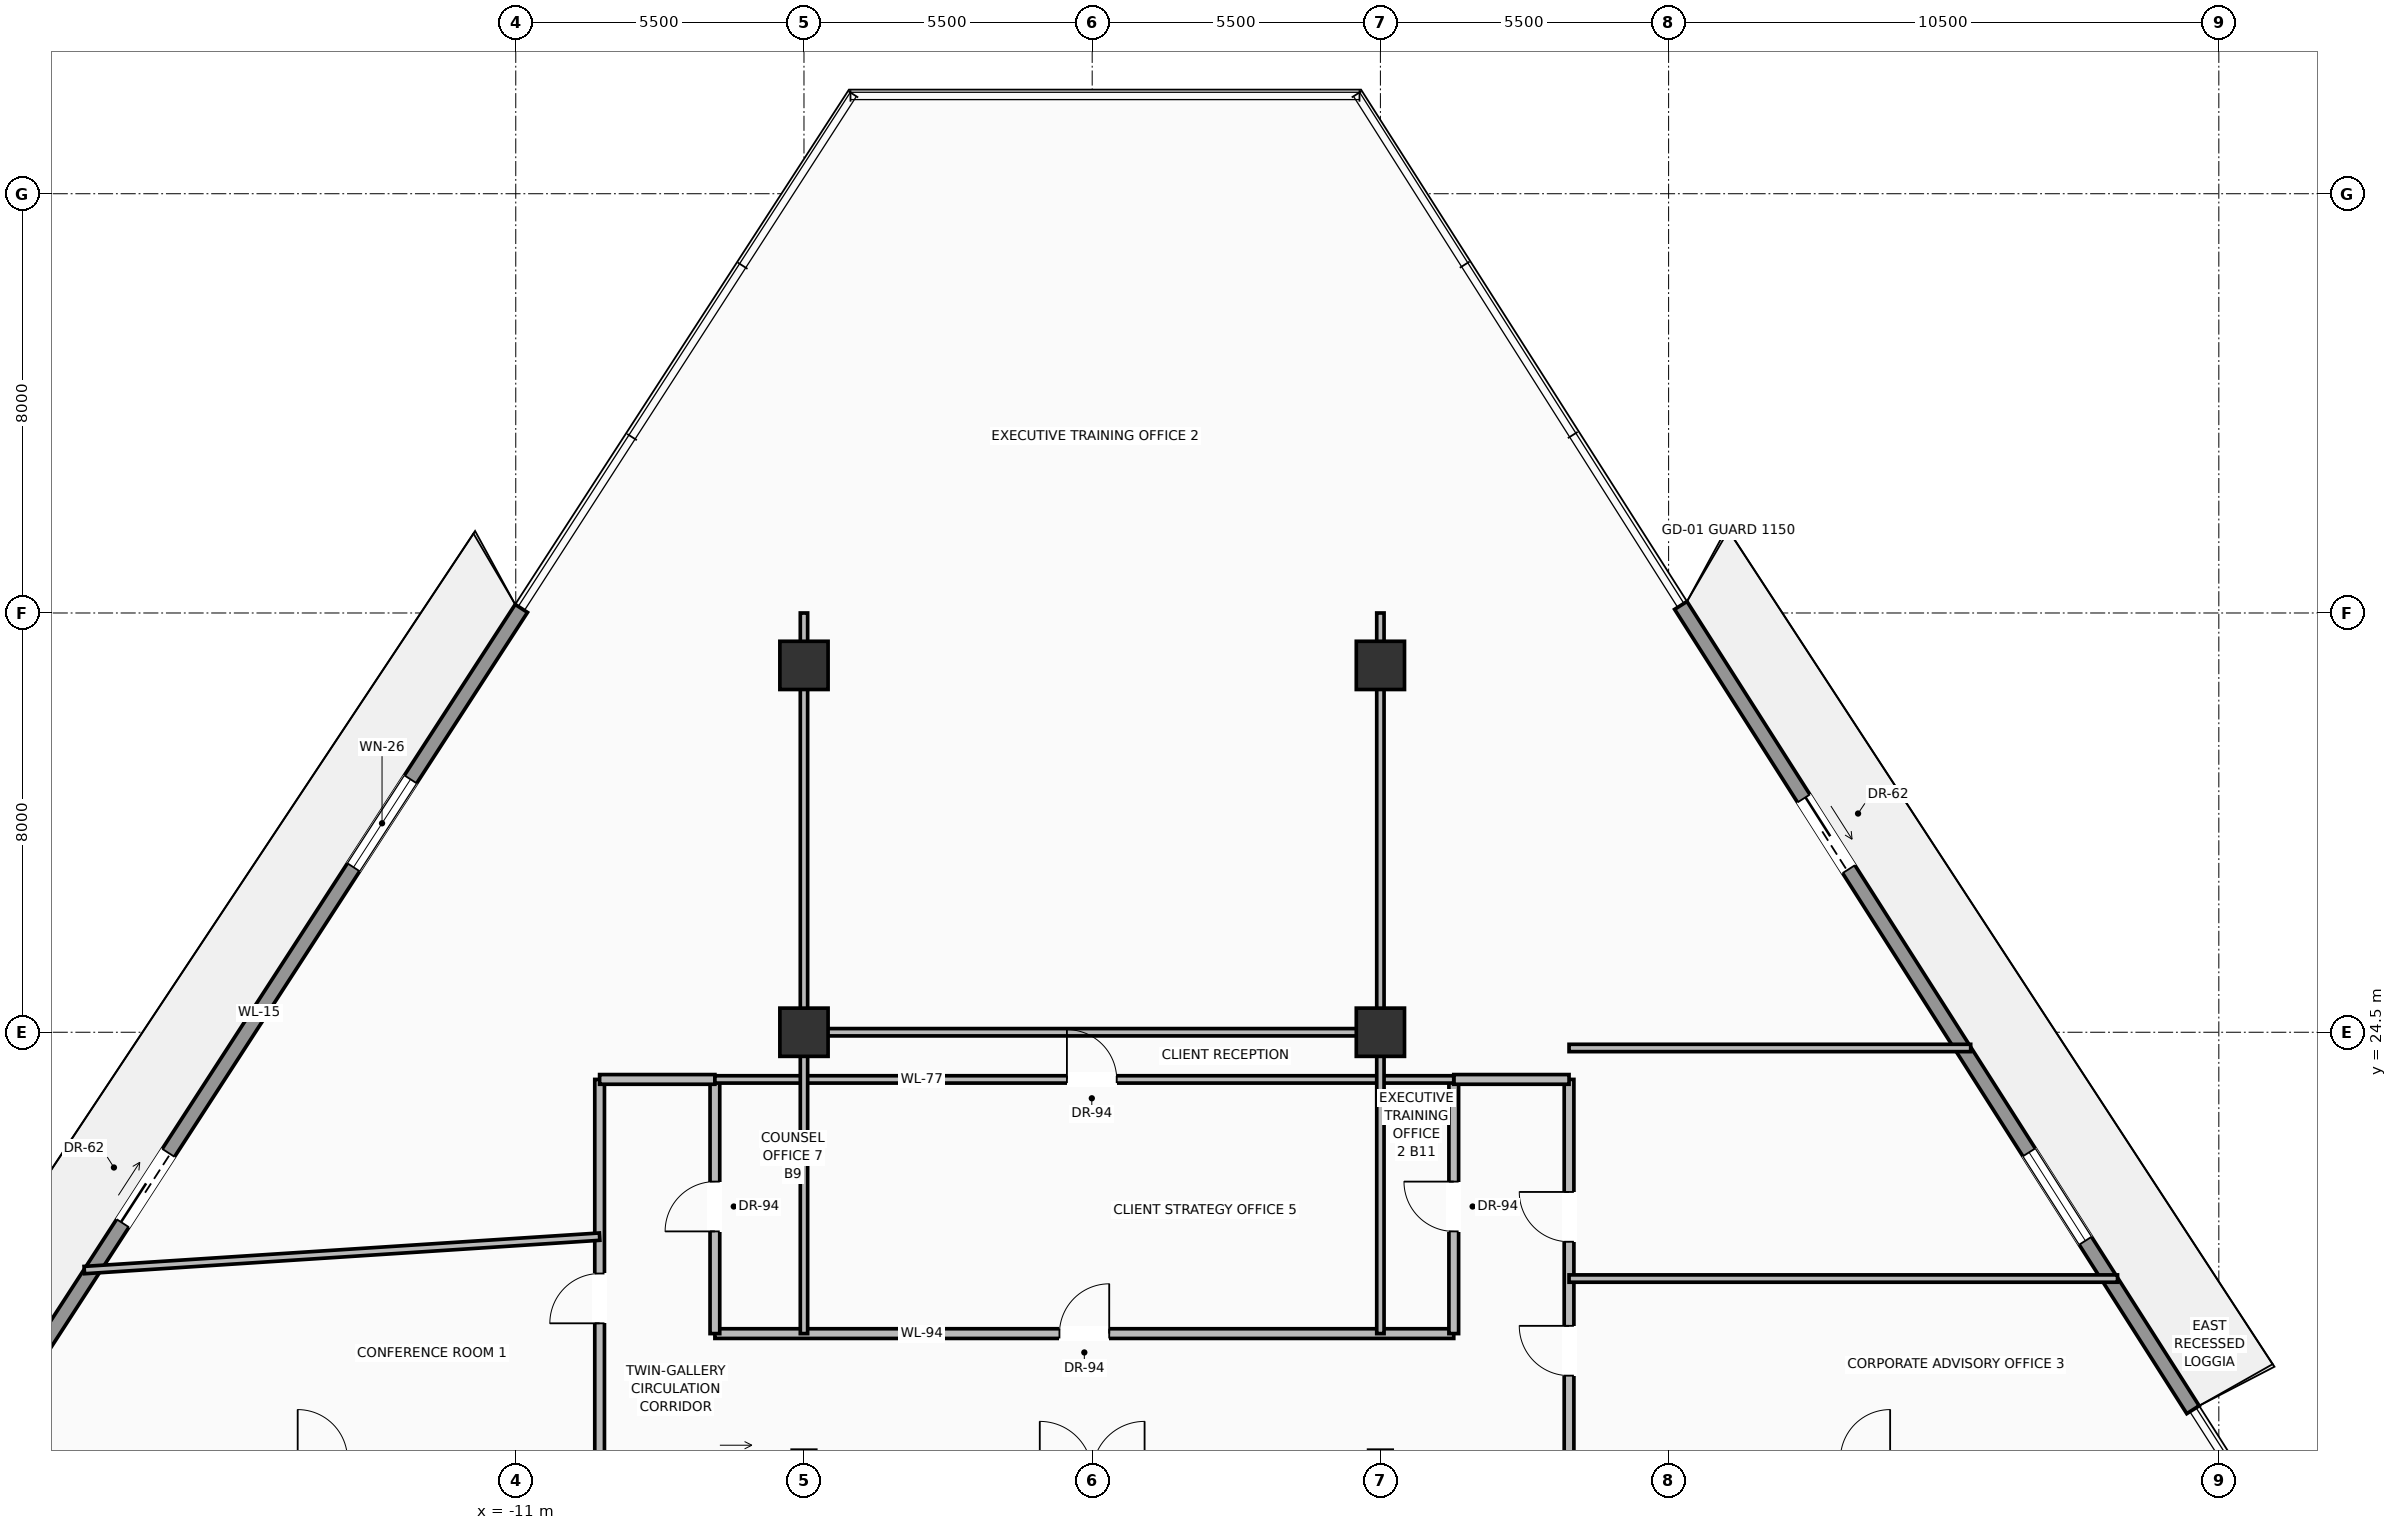
"""IFC4 building model, lengths in metres.
Left out: names, types, materials, properties, quantities, classifications, styles, units other than length and angle.
Written with IfcOpenShell. Run it as: python <this file> out.ifc"""

import sys

from ifc_helpers import new_model, si_unit, direction, frame, frame_2d, origin, origin_2d, place, context, subcontext, project, spatial, rectangle, extrude, source, transform, mapped, element, fill, save


model = new_model("IFC4")
c1 = context("Model", 3, precision=1e-05, world=origin(), true_north=direction((0.0, 1.0)))
c2 = subcontext(c1, "Body", "Model", "MODEL_VIEW")
j1 = project(units=[si_unit("LENGTHUNIT", "METRE"), si_unit("PLANEANGLEUNIT", "RADIAN")], contexts=[c1])
p1 = place(None, origin())
s1 = spatial("IfcSite", under=j1, at=p1, CompositionType="ELEMENT")
p2 = place(p1, origin())
s2 = spatial("IfcBuilding", under=s1, at=p2, CompositionType="ELEMENT")
p3 = place(p2, frame((0.0, 0.0, 144.1)))
s3 = spatial("IfcBuildingStorey", under=s2, at=p3, CompositionType="ELEMENT", Elevation=144.1)
m1 = source(origin(), c2, "Body", "SweptSolid", [
    extrude(rectangle(XDim=0.92, YDim=0.92, at=origin_2d()), origin(), (0.0, 0.0, 1.0), 3.7),
])
for number, where, z_axis, x_axis in (
    (1, (-5.5, 24.5, 0.0), (0.0, 0.0, 1.0), (1.0, 0.0, 0.0)),
    (2, (5.5, 24.5, 0.0), (0.0, 0.0, 1.0), (1.0, 0.0, 0.0)),
    (3, (-5.5, 31.5, 0.0), (0.0, 0.0, 1.0), (1.0, 0.0, 0.0)),
    (4, (5.5, 31.5, 0.0), (0.0, 0.0, 1.0), (1.0, 0.0, 0.0)),
):
    element("IfcColumn", number, at=place(p3, frame(where, z_axis=z_axis, x_axis=x_axis)), inside=s3, PredefinedType="COLUMN", context=c2, shape_type="MappedRepresentation", body=[
        mapped(m1, transform((0.0, 0.0, 0.0), scale=1.0)),
    ])
p4 = place(p3, frame((-20.901, 17.152, 0.0), z_axis=(0.0, 0.0, 1.0), x_axis=(0.544015380352, 0.839075244505, 0.0)))
e5 = element("IfcWall", 5, at=p4, inside=s3, PredefinedType="SOLIDWALL", context=c2, shape_type="SweptSolid", body=[
    extrude(rectangle(XDim=18.396, YDim=0.28, at=frame_2d((9.198, 0.0))), origin(), (0.0, 0.0, 1.0), 3.05),
])
p5 = place(p4, frame((4.415, 0.0, 0.0)))
e6 = element("IfcOpeningElement", 6, at=p5, cuts=e5, PredefinedType="OPENING", context=c2, shape_type="SweptSolid", body=[
    extrude(rectangle(XDim=1.6, YDim=2.35, at=frame_2d((0.8, 1.175))), frame((0.0, 0.15, 0.0), z_axis=(0.0, -1.0, 0.0), x_axis=(1.0, 0.0, 0.0)), (0.0, 0.0, 1.0), 0.3),
])
p6 = place(p4, frame((12.509, 0.0, 0.9)))
e7 = element("IfcOpeningElement", 7, at=p6, cuts=e5, PredefinedType="OPENING", context=c2, shape_type="SweptSolid", body=[
    extrude(rectangle(XDim=2.0, YDim=1.85, at=frame_2d((1.0, 0.925))), frame((0.0, 0.15, 0.0), z_axis=(0.0, -1.0, 0.0), x_axis=(1.0, 0.0, 0.0)), (0.0, 0.0, 1.0), 0.3),
])
p7 = place(p3, frame((11.233, 32.645, 0.0), z_axis=(0.0, 0.0, 1.0), x_axis=(0.537170652274, -0.843473586033, 0.0)))
e8 = element("IfcWall", 8, at=p7, inside=s3, PredefinedType="SOLIDWALL", context=c2, shape_type="SweptSolid", body=[
    extrude(rectangle(XDim=18.195, YDim=0.28, at=frame_2d((9.098, 0.0))), origin(), (0.0, 0.0, 1.0), 3.05),
])
p8 = place(p7, frame((4.367, 0.0, 0.0)))
e9 = element("IfcOpeningElement", 9, at=p8, cuts=e8, PredefinedType="OPENING", context=c2, shape_type="SweptSolid", body=[
    extrude(rectangle(XDim=1.6, YDim=2.35, at=frame_2d((0.8, 1.175))), frame((0.0, 0.15, 0.0), z_axis=(0.0, -1.0, 0.0), x_axis=(1.0, 0.0, 0.0)), (0.0, 0.0, 1.0), 0.3),
])
p9 = place(p7, frame((12.373, 0.0, 0.9)))
e10 = element("IfcOpeningElement", 10, at=p9, cuts=e8, PredefinedType="OPENING", context=c2, shape_type="SweptSolid", body=[
    extrude(rectangle(XDim=2.0, YDim=1.85, at=frame_2d((1.0, 0.925))), frame((0.0, 0.15, 0.0), z_axis=(0.0, -1.0, 0.0), x_axis=(1.0, 0.0, 0.0)), (0.0, 0.0, 1.0), 0.3),
])
p10 = place(p3, frame((-7.2, 18.75, 0.0), z_axis=(0.0, 0.0, 1.0), x_axis=(1.0, 0.0, 0.0)))
e11 = element("IfcWall", 11, at=p10, inside=s3, PredefinedType="PARTITIONING", context=c2, shape_type="SweptSolid", body=[
    extrude(rectangle(XDim=14.1, YDim=0.185, at=frame_2d((7.05, 0.0))), origin(), (0.0, 0.0, 1.0), 2.846),
])
p11 = place(p10, frame((6.575, 0.0, 0.0)))
e12 = element("IfcOpeningElement", 12, at=p11, cuts=e11, PredefinedType="OPENING", context=c2, shape_type="SweptSolid", body=[
    extrude(rectangle(XDim=0.95, YDim=2.2, at=frame_2d((0.475, 1.1))), frame((0.0, 0.103, 0.0), z_axis=(0.0, -1.0, 0.0), x_axis=(1.0, 0.0, 0.0)), (0.0, 0.0, 1.0), 0.205),
])
p12 = place(p3, frame((-7.2, 18.75, 0.0), z_axis=(0.0, 0.0, 1.0), x_axis=(0.0, 1.0, 0.0)))
e13 = element("IfcWall", 13, at=p12, inside=s3, PredefinedType="PARTITIONING", context=c2, shape_type="SweptSolid", body=[
    extrude(rectangle(XDim=4.85, YDim=0.185, at=frame_2d((2.425, 0.0))), origin(), (0.0, 0.0, 1.0), 3.462),
])
p13 = place(p12, frame((1.95, 0.0, 0.0)))
e14 = element("IfcOpeningElement", 14, at=p13, cuts=e13, PredefinedType="OPENING", context=c2, shape_type="SweptSolid", body=[
    extrude(rectangle(XDim=0.95, YDim=2.2, at=frame_2d((0.475, 1.1))), frame((0.0, 0.103, 0.0), z_axis=(0.0, -1.0, 0.0), x_axis=(1.0, 0.0, 0.0)), (0.0, 0.0, 1.0), 0.205),
])
p14 = place(p3, frame((6.9, 18.75, 0.0), z_axis=(0.0, 0.0, 1.0), x_axis=(0.0, 1.0, 0.0)))
e15 = element("IfcWall", 15, at=p14, inside=s3, PredefinedType="PARTITIONING", context=c2, shape_type="SweptSolid", body=[
    extrude(rectangle(XDim=4.85, YDim=0.185, at=frame_2d((2.425, 0.0))), origin(), (0.0, 0.0, 1.0), 3.462),
])
p15 = place(p14, frame((1.95, 0.0, 0.0)))
e16 = element("IfcOpeningElement", 16, at=p15, cuts=e15, PredefinedType="OPENING", context=c2, shape_type="SweptSolid", body=[
    extrude(rectangle(XDim=0.95, YDim=2.2, at=frame_2d((0.475, 1.1))), frame((0.0, 0.103, 0.0), z_axis=(0.0, -1.0, 0.0), x_axis=(1.0, 0.0, 0.0)), (0.0, 0.0, 1.0), 0.205),
])
p16 = place(p3, frame((-9.4, 16.4, 0.0), z_axis=(0.0, 0.0, 1.0), x_axis=(0.0, 1.0, 0.0)))
e17 = element("IfcWall", 17, at=p16, inside=s3, PredefinedType="PARTITIONING", context=c2, shape_type="SweptSolid", body=[
    extrude(rectangle(XDim=7.2, YDim=0.185, at=frame_2d((3.6, 0.0))), origin(), (0.0, 0.0, 1.0), 3.462),
])
p17 = place(p16, frame((2.546, 0.0, 0.0)))
e18 = element("IfcOpeningElement", 18, at=p17, cuts=e17, PredefinedType="OPENING", context=c2, shape_type="SweptSolid", body=[
    extrude(rectangle(XDim=0.95, YDim=2.2, at=frame_2d((0.475, 1.1))), frame((0.0, 0.103, 0.0), z_axis=(0.0, -1.0, 0.0), x_axis=(1.0, 0.0, 0.0)), (0.0, 0.0, 1.0), 0.205),
])
p18 = place(p3, frame((9.1, 16.4, 0.0), z_axis=(0.0, 0.0, 1.0), x_axis=(0.0, 1.0, 0.0)))
e19 = element("IfcWall", 19, at=p18, inside=s3, PredefinedType="PARTITIONING", context=c2, shape_type="SweptSolid", body=[
    extrude(rectangle(XDim=7.2, YDim=0.185, at=frame_2d((3.6, 0.0))), origin(), (0.0, 0.0, 1.0), 3.462),
])
p19 = place(p18, frame((4.103, 0.0, 0.0)))
e20 = element("IfcOpeningElement", 20, at=p19, cuts=e19, PredefinedType="OPENING", context=c2, shape_type="SweptSolid", body=[
    extrude(rectangle(XDim=0.95, YDim=2.2, at=frame_2d((0.475, 1.1))), frame((0.0, 0.103, 0.0), z_axis=(0.0, -1.0, 0.0), x_axis=(1.0, 0.0, 0.0)), (0.0, 0.0, 1.0), 0.205),
])
p20 = place(p18, frame((1.548, 0.0, 0.0)))
e21 = element("IfcOpeningElement", 21, at=p20, cuts=e19, PredefinedType="OPENING", context=c2, shape_type="SweptSolid", body=[
    extrude(rectangle(XDim=0.95, YDim=2.2, at=frame_2d((0.475, 1.1))), frame((0.0, 0.103, 0.0), z_axis=(0.0, -1.0, 0.0), x_axis=(1.0, 0.0, 0.0)), (0.0, 0.0, 1.0), 0.205),
])
p21 = place(p3, frame((-9.4, 23.6, 0.0), z_axis=(0.0, 0.0, 1.0), x_axis=(1.0, 0.0, 0.0)))
e22 = element("IfcWall", 22, at=p21, inside=s3, PredefinedType="PARTITIONING", context=c2, shape_type="SweptSolid", body=[
    extrude(rectangle(XDim=2.2, YDim=0.185, at=frame_2d((1.1, 0.0))), origin(), (0.0, 0.0, 1.0), 3.462),
])
p22 = place(p3, frame((6.9, 23.6, 0.0), z_axis=(0.0, 0.0, 1.0), x_axis=(1.0, 0.0, 0.0)))
e23 = element("IfcWall", 23, at=p22, inside=s3, PredefinedType="PARTITIONING", context=c2, shape_type="SweptSolid", body=[
    extrude(rectangle(XDim=2.2, YDim=0.185, at=frame_2d((1.1, 0.0))), origin(), (0.0, 0.0, 1.0), 3.462),
])
p23 = place(p3, frame((-7.2, 23.6, 0.0), z_axis=(0.0, 0.0, 1.0), x_axis=(1.0, 0.0, 0.0)))
e24 = element("IfcWall", 24, at=p23, inside=s3, PredefinedType="PARTITIONING", context=c2, shape_type="SweptSolid", body=[
    extrude(rectangle(XDim=14.1, YDim=0.14, at=frame_2d((7.05, 0.0))), origin(), (0.0, 0.0, 1.0), 3.462),
])
p24 = place(p23, frame((6.718, 0.0, 0.0)))
e25 = element("IfcOpeningElement", 25, at=p24, cuts=e24, PredefinedType="OPENING", context=c2, shape_type="SweptSolid", body=[
    extrude(rectangle(XDim=0.95, YDim=2.2, at=frame_2d((0.475, 1.1))), frame((0.0, 0.08, 0.0), z_axis=(0.0, -1.0, 0.0), x_axis=(1.0, 0.0, 0.0)), (0.0, 0.0, 1.0), 0.16),
])
for number, where, z_axis, x_axis in (
    (26, (-5.5, 18.75, 0.0), (0.0, 0.0, 1.0), (0.0, 1.0, 0.0)),
    (27, (5.5, 18.75, 0.0), (0.0, 0.0, 1.0), (0.0, 1.0, 0.0)),
):
    element("IfcWall", number, at=place(p3, frame(where, z_axis=z_axis, x_axis=x_axis)), inside=s3, PredefinedType="PARTITIONING", context=c2, shape_type="SweptSolid", body=[
        extrude(rectangle(XDim=13.75, YDim=0.14, at=frame_2d((6.875, 0.0))), origin(), (0.0, 0.0, 1.0), 2.846),
    ])
p25 = place(p3, frame((-5.5, 24.5, 0.0), z_axis=(0.0, 0.0, 1.0), x_axis=(1.0, 0.0, 0.0)))
e28 = element("IfcWall", 28, at=p25, inside=s3, PredefinedType="PARTITIONING", context=c2, shape_type="SweptSolid", body=[
    extrude(rectangle(XDim=11.0, YDim=0.14, at=frame_2d((5.5, 0.0))), origin(), (0.0, 0.0, 1.0), 2.846),
])
p26 = place(p3, frame((-19.234, 19.962, 0.0), z_axis=(0.0, 0.0, 1.0), x_axis=(0.997901003893, 0.064757906313, 0.0)))
e29 = element("IfcWall", 29, at=p26, inside=s3, PredefinedType="PARTITIONING", context=c2, shape_type="SweptSolid", body=[
    extrude(rectangle(XDim=9.855, YDim=0.14, at=frame_2d((4.927, 0.0))), origin(), (0.0, 0.0, 1.0), 3.462),
])
p27 = place(p3, frame((9.1, 19.8, 0.0), z_axis=(0.0, 0.0, 1.0), x_axis=(1.0, 0.0, 0.0)))
e30 = element("IfcWall", 30, at=p27, inside=s3, PredefinedType="PARTITIONING", context=c2, shape_type="SweptSolid", body=[
    extrude(rectangle(XDim=10.467, YDim=0.14, at=frame_2d((5.233, 0.0))), origin(), (0.0, 0.0, 1.0), 3.462),
])
p28 = place(p3, frame((9.1, 24.2, 0.0), z_axis=(0.0, 0.0, 1.0), x_axis=(1.0, 0.0, 0.0)))
e31 = element("IfcWall", 31, at=p28, inside=s3, PredefinedType="PARTITIONING", context=c2, shape_type="SweptSolid", body=[
    extrude(rectangle(XDim=7.665, YDim=0.14, at=frame_2d((3.832, 0.0))), origin(), (0.0, 0.0, 1.0), 3.462),
])
m2 = source(origin(), c2, "Body", "SweptSolid", [
    extrude(rectangle(XDim=1.6, YDim=2.35, at=frame_2d((0.8, 1.175))), frame((0.0, 0.025, 0.0), z_axis=(0.0, -1.0, 0.0), x_axis=(1.0, 0.0, 0.0)), (0.0, 0.0, 1.0), 0.05),
])
p29 = place(p5, origin())
e32 = element("IfcDoor", 32, at=p29, inside=s3, OperationType="SLIDING_TO_LEFT", PredefinedType="DOOR", context=c2, shape_type="MappedRepresentation", body=[
    mapped(m2, transform((0.0, 0.0, 0.0), scale=1.0)),
])
fill(e6, e32)
m3 = source(origin(), c2, "Body", "SweptSolid", [
    extrude(rectangle(XDim=2.0, YDim=1.85, at=frame_2d((1.0, 0.925))), frame((0.0, 0.03, 0.0), z_axis=(0.0, -1.0, 0.0), x_axis=(1.0, 0.0, 0.0)), (0.0, 0.0, 1.0), 0.06),
])
p30 = place(p6, origin())
e33 = element("IfcWindow", 33, at=p30, inside=s3, PartitioningType="SINGLE_PANEL", PredefinedType="WINDOW", context=c2, shape_type="MappedRepresentation", body=[
    mapped(m3, transform((0.0, 0.0, 0.0), scale=1.0)),
])
fill(e7, e33)
p31 = place(p8, origin())
e34 = element("IfcDoor", 34, at=p31, inside=s3, OperationType="SLIDING_TO_RIGHT", PredefinedType="DOOR", context=c2, shape_type="MappedRepresentation", body=[
    mapped(m2, transform((0.0, 0.0, 0.0), scale=1.0)),
])
fill(e9, e34)
p32 = place(p9, origin())
e35 = element("IfcWindow", 35, at=p32, inside=s3, PartitioningType="SINGLE_PANEL", PredefinedType="WINDOW", context=c2, shape_type="MappedRepresentation", body=[
    mapped(m3, transform((0.0, 0.0, 0.0), scale=1.0)),
])
fill(e10, e35)
m4 = source(origin(), c2, "Body", "SweptSolid", [
    extrude(rectangle(XDim=0.95, YDim=2.2, at=frame_2d((0.475, 1.1))), frame((0.0, 0.025, 0.0), z_axis=(0.0, -1.0, 0.0), x_axis=(1.0, 0.0, 0.0)), (0.0, 0.0, 1.0), 0.05),
])
p33 = place(p11, origin())
e36 = element("IfcDoor", 36, at=p33, inside=s3, OperationType="SINGLE_SWING_RIGHT", PredefinedType="DOOR", context=c2, shape_type="MappedRepresentation", body=[
    mapped(m4, transform((0.0, 0.0, 0.0), scale=1.0)),
])
fill(e12, e36)
p34 = place(p17, origin())
e37 = element("IfcDoor", 37, at=p34, inside=s3, OperationType="SINGLE_SWING_LEFT", PredefinedType="DOOR", context=c2, shape_type="MappedRepresentation", body=[
    mapped(m4, transform((0.0, 0.0, 0.0), scale=1.0)),
])
fill(e18, e37)
p35 = place(p19, origin())
e38 = element("IfcDoor", 38, at=p35, inside=s3, OperationType="SINGLE_SWING_RIGHT", PredefinedType="DOOR", context=c2, shape_type="MappedRepresentation", body=[
    mapped(m4, transform((0.0, 0.0, 0.0), scale=1.0)),
])
fill(e20, e38)
p36 = place(p20, origin())
e39 = element("IfcDoor", 39, at=p36, inside=s3, OperationType="SINGLE_SWING_RIGHT", PredefinedType="DOOR", context=c2, shape_type="MappedRepresentation", body=[
    mapped(m4, transform((0.0, 0.0, 0.0), scale=1.0)),
])
fill(e21, e39)
p37 = place(p13, origin())
e40 = element("IfcDoor", 40, at=p37, inside=s3, OperationType="SINGLE_SWING_LEFT", PredefinedType="DOOR", context=c2, shape_type="MappedRepresentation", body=[
    mapped(m4, transform((0.0, 0.0, 0.0), scale=1.0)),
])
fill(e14, e40)
p38 = place(p15, origin())
e41 = element("IfcDoor", 41, at=p38, inside=s3, OperationType="SINGLE_SWING_RIGHT", PredefinedType="DOOR", context=c2, shape_type="MappedRepresentation", body=[
    mapped(m4, transform((0.0, 0.0, 0.0), scale=1.0)),
])
fill(e16, e41)
p39 = place(p24, origin())
e42 = element("IfcDoor", 42, at=p39, inside=s3, OperationType="SINGLE_SWING_LEFT", PredefinedType="DOOR", context=c2, shape_type="MappedRepresentation", body=[
    mapped(m4, transform((0.0, 0.0, 0.0), scale=1.0)),
])
fill(e25, e42)
save(model, sys.argv[1])
